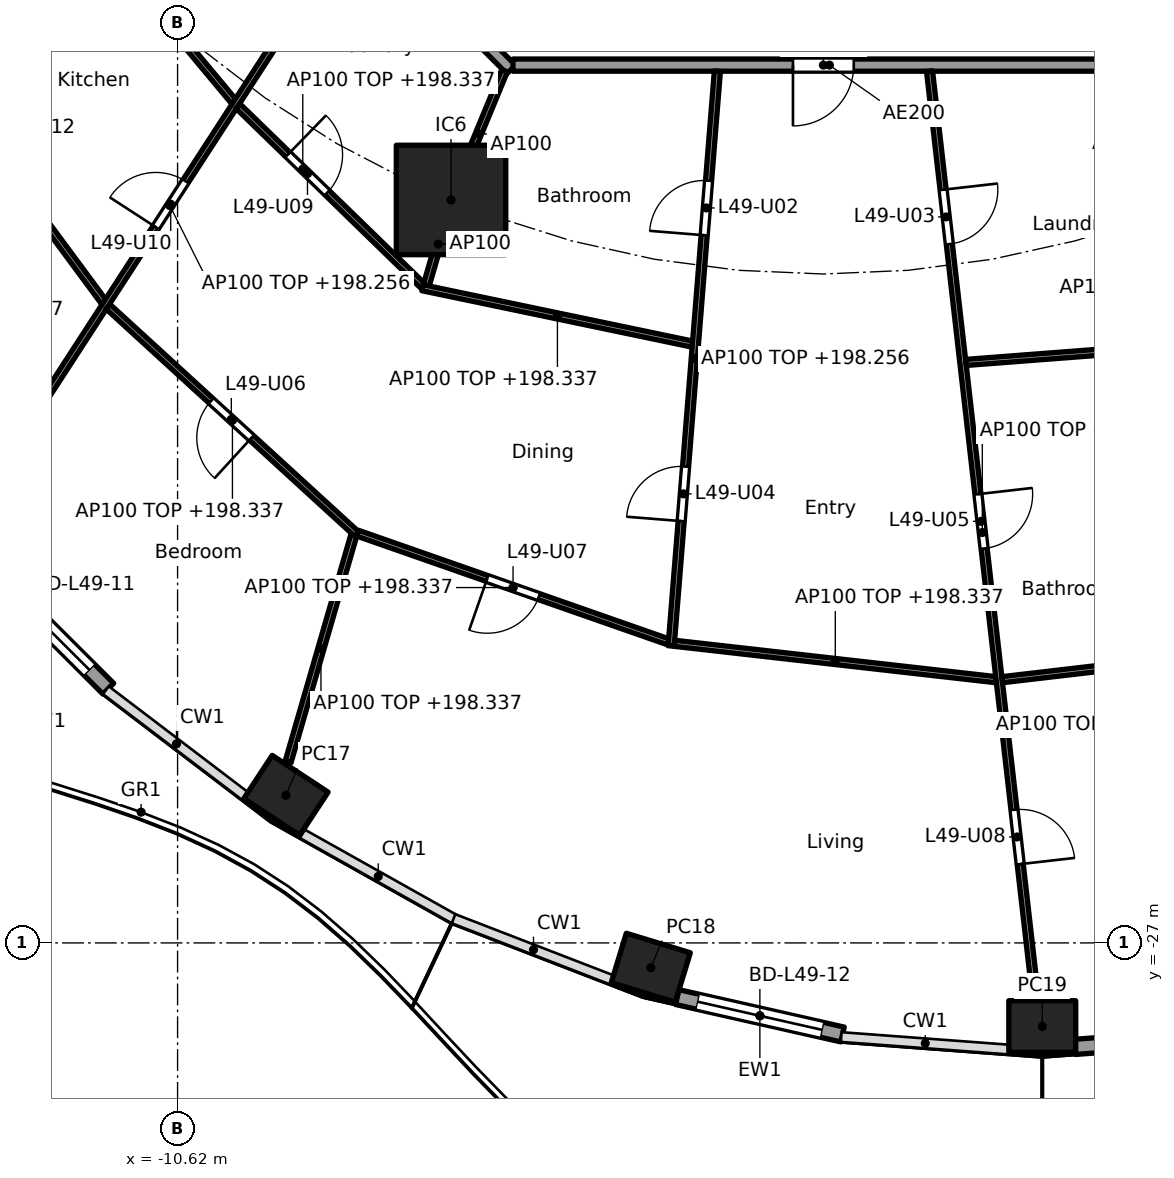
"""IFC4 building model, lengths in metres.
Left out: names, types, materials, properties, quantities, classifications, styles, units other than length and angle.
Written with IfcOpenShell. Run it as: python <this file> out.ifc"""

import sys

from ifc_helpers import new_model, si_unit, direction, frame, frame_2d, origin, origin_2d, place, context, subcontext, project, spatial, rectangle, hollow_rectangle, extrude, element, fill, save


model = new_model("IFC4")
c1 = context("Model", 3, precision=1e-05, world=origin(), true_north=direction((0.0, 1.0)))
c2 = subcontext(c1, "Body", "Model", "MODEL_VIEW")
j1 = project(units=[si_unit("LENGTHUNIT", "METRE"), si_unit("PLANEANGLEUNIT", "RADIAN")], contexts=[c1])
p1 = place(None, origin())
s1 = spatial("IfcSite", under=j1, at=p1, CompositionType="ELEMENT")
p2 = place(p1, origin())
s2 = spatial("IfcBuilding", under=s1, at=p2, CompositionType="ELEMENT")
p3 = place(p2, frame((0.0, 0.0, 195.5)))
s3 = spatial("IfcBuildingStorey", under=s2, at=p3, CompositionType="ELEMENT", Elevation=195.5)
for number, where, z_axis, x_axis in (
    (1, (-8.837, -24.573, 0.0), (0.0, 0.0, 1.0), (0.836, -0.549, 0.0)),
    (2, (-2.838, -27.408, 0.0), (0.0, 0.0, 1.0), (0.957, -0.292, 0.0)),
    (3, (3.6, -28.375, 0.0), (0.0, 0.0, 1.0), (1.0, 0.0, 0.0)),
):
    element("IfcColumn", number, at=place(p3, frame(where, z_axis=z_axis, x_axis=x_axis)), inside=s3, PredefinedType="COLUMN", context=c2, shape_type="SweptSolid", body=[
        extrude(hollow_rectangle(XDim=1.1, YDim=0.85, WallThickness=0.036, at=origin_2d()), origin(), (0.0, 0.0, 1.0), 3.7),
    ])
p4 = place(p3, frame((-6.123, -14.782, 0.0), z_axis=(0.0, 0.0, 1.0), x_axis=(1.0, 0.0, 0.0)))
e4 = element("IfcColumn", 4, at=p4, inside=s3, PredefinedType="COLUMN", context=c2, shape_type="SweptSolid", body=[
    extrude(rectangle(XDim=1.8, YDim=1.8, at=origin_2d()), origin(), (0.0, 0.0, 1.0), 3.7),
])
p5 = place(p3, frame((-11.759, -22.82, 0.0), z_axis=(0.0, 0.0, 1.0), x_axis=(-0.707844845069, 0.706367946122, 0.0)))
e5 = element("IfcWall", 5, at=p5, inside=s3, PredefinedType="SOLIDWALL", context=c2, shape_type="SweptSolid", body=[
    extrude(rectangle(XDim=2.976, YDim=0.25, at=frame_2d((1.488, 0.0))), origin(), (0.0, 0.0, 1.0), 3.44),
])
p6 = place(p5, frame((0.438, 0.0, 0.0)))
e6 = element("IfcOpeningElement", 6, at=p6, cuts=e5, PredefinedType="OPENING", context=c2, shape_type="SweptSolid", body=[
    extrude(rectangle(XDim=2.1, YDim=2.4, at=frame_2d((1.05, 1.2))), frame((0.0, 0.135, 0.0), z_axis=(0.0, -1.0, 0.0), x_axis=(1.0, 0.0, 0.0)), (0.0, 0.0, 1.0), 0.27),
])
p7 = place(p3, frame((0.315, -28.506, 0.0), z_axis=(0.0, 0.0, 1.0), x_axis=(-0.975324329911, 0.220776926974, 0.0)))
e7 = element("IfcWall", 7, at=p7, inside=s3, PredefinedType="SOLIDWALL", context=c2, shape_type="SweptSolid", body=[
    extrude(rectangle(XDim=2.788, YDim=0.25, at=frame_2d((1.394, 0.0))), origin(), (0.0, 0.0, 1.0), 3.44),
])
p8 = place(p7, frame((0.344, 0.0, 0.0)))
e8 = element("IfcOpeningElement", 8, at=p8, cuts=e7, PredefinedType="OPENING", context=c2, shape_type="SweptSolid", body=[
    extrude(rectangle(XDim=2.1, YDim=2.4, at=frame_2d((1.05, 1.2))), frame((0.0, 0.135, 0.0), z_axis=(0.0, -1.0, 0.0), x_axis=(1.0, 0.0, 0.0)), (0.0, 0.0, 1.0), 0.27),
])
p9 = place(p3, frame((6.903, -28.503, 0.0), z_axis=(0.0, 0.0, 1.0), x_axis=(-0.997232064422, -0.074351931305, 0.0)))
e9 = element("IfcWall", 9, at=p9, inside=s3, PredefinedType="SOLIDWALL", context=c2, shape_type="SweptSolid", body=[
    extrude(rectangle(XDim=2.771, YDim=0.25, at=frame_2d((1.386, 0.0))), origin(), (0.0, 0.0, 1.0), 3.44),
])
p10 = place(p9, frame((0.336, 0.0, 0.0)))
e10 = element("IfcOpeningElement", 10, at=p10, cuts=e9, PredefinedType="OPENING", context=c2, shape_type="SweptSolid", body=[
    extrude(rectangle(XDim=2.1, YDim=2.4, at=frame_2d((1.05, 1.2))), frame((0.0, 0.135, 0.0), z_axis=(0.0, -1.0, 0.0), x_axis=(1.0, 0.0, 0.0)), (0.0, 0.0, 1.0), 0.27),
])
p11 = place(p3, frame((-12.635, -5.134, 0.0), z_axis=(0.0, 0.0, 1.0), x_axis=(0.707106781187, -0.707106781187, 0.0)))
e11 = element("IfcWall", 11, at=p11, inside=s3, PredefinedType="PARTITIONING", context=c2, shape_type="SweptSolid", body=[
    extrude(rectangle(XDim=10.609, YDim=0.2, at=frame_2d((5.305, 0.0))), origin(), (0.0, 0.0, 1.0), 3.44),
])
p12 = place(p3, frame((-5.104, -12.565, 0.0), z_axis=(0.0, 0.0, 1.0), x_axis=(1.0, 0.0, 0.0)))
e12 = element("IfcWall", 12, at=p12, inside=s3, PredefinedType="PARTITIONING", context=c2, shape_type="SweptSolid", body=[
    extrude(rectangle(XDim=10.409, YDim=0.2, at=frame_2d((5.205, 0.0))), origin(), (0.0, 0.0, 1.0), 3.44),
])
p13 = place(p12, frame((4.604, 0.0, 0.0)))
e13 = element("IfcOpeningElement", 13, at=p13, cuts=e12, PredefinedType="OPENING", context=c2, shape_type="SweptSolid", body=[
    extrude(rectangle(XDim=1.0, YDim=2.1, at=frame_2d((0.5, 1.05))), frame((0.0, 0.11, 0.0), z_axis=(0.0, -1.0, 0.0), x_axis=(1.0, 0.0, 0.0)), (0.0, 0.0, 1.0), 0.22),
])
p14 = place(p3, frame((-12.623, -9.653, 0.0), z_axis=(0.0, 0.0, 1.0), x_axis=(0.640315711982, -0.768111833647, 0.0)))
e14 = element("IfcWall", 14, at=p14, inside=s3, PredefinedType="PARTITIONING", context=c2, shape_type="SweptSolid", body=[
    extrude(rectangle(XDim=4.572, YDim=0.1, at=frame_2d((2.286, 0.0))), origin(), (0.0, 0.0, 1.0), 2.837),
])
p15 = place(p14, frame((1.861, 0.0, 0.0)))
e15 = element("IfcOpeningElement", 15, at=p15, cuts=e14, PredefinedType="OPENING", context=c2, shape_type="SweptSolid", body=[
    extrude(rectangle(XDim=0.9, YDim=2.1, at=frame_2d((0.45, 1.05))), frame((0.0, 0.06, 0.0), z_axis=(0.0, -1.0, 0.0), x_axis=(1.0, 0.0, 0.0)), (0.0, 0.0, 1.0), 0.12),
])
p16 = place(p3, frame((-15.265, -11.821, 0.0), z_axis=(0.0, 0.0, 1.0), x_axis=(0.594721645029, -0.803931691709, 0.0)))
e16 = element("IfcWall", 16, at=p16, inside=s3, PredefinedType="PARTITIONING", context=c2, shape_type="SweptSolid", body=[
    extrude(rectangle(XDim=5.772, YDim=0.1, at=frame_2d((2.886, 0.0))), origin(), (0.0, 0.0, 1.0), 2.837),
])
p17 = place(p16, frame((2.461, 0.0, 0.0)))
e17 = element("IfcOpeningElement", 17, at=p17, cuts=e16, PredefinedType="OPENING", context=c2, shape_type="SweptSolid", body=[
    extrude(rectangle(XDim=0.9, YDim=2.1, at=frame_2d((0.45, 1.05))), frame((0.0, 0.06, 0.0), z_axis=(0.0, -1.0, 0.0), x_axis=(1.0, 0.0, 0.0)), (0.0, 0.0, 1.0), 0.12),
])
p18 = place(p3, frame((-7.712, -10.195, 0.0), z_axis=(0.0, 0.0, 1.0), x_axis=(-0.544176533609, -0.838970738625, 0.0)))
e18 = element("IfcWall", 18, at=p18, inside=s3, PredefinedType="PARTITIONING", context=c2, shape_type="SweptSolid", body=[
    extrude(rectangle(XDim=11.156, YDim=0.1, at=frame_2d((5.578, 0.0))), origin(), (0.0, 0.0, 1.0), 2.756),
])
p19 = place(p18, frame((5.101, 0.0, 0.0)))
e19 = element("IfcOpeningElement", 19, at=p19, cuts=e18, PredefinedType="OPENING", context=c2, shape_type="SweptSolid", body=[
    extrude(rectangle(XDim=0.9, YDim=2.1, at=frame_2d((0.45, 1.05))), frame((0.0, 0.06, 0.0), z_axis=(0.0, -1.0, 0.0), x_axis=(1.0, 0.0, 0.0)), (0.0, 0.0, 1.0), 0.12),
])
p20 = place(p3, frame((-9.627, -13.238, 0.0), z_axis=(0.0, 0.0, 1.0), x_axis=(0.716946269374, -0.697128429223, 0.0)))
e20 = element("IfcWall", 20, at=p20, inside=s3, PredefinedType="PARTITIONING", context=c2, shape_type="SweptSolid", body=[
    extrude(rectangle(XDim=4.25, YDim=0.1, at=frame_2d((2.125, 0.0))), origin(), (0.0, 0.0, 1.0), 2.837),
])
p21 = place(p20, frame((1.145, 0.0, 0.0)))
e21 = element("IfcOpeningElement", 21, at=p21, cuts=e20, PredefinedType="OPENING", context=c2, shape_type="SweptSolid", body=[
    extrude(rectangle(XDim=0.9, YDim=2.1, at=frame_2d((0.45, 1.05))), frame((0.0, 0.06, 0.0), z_axis=(0.0, -1.0, 0.0), x_axis=(1.0, 0.0, 0.0)), (0.0, 0.0, 1.0), 0.12),
])
p22 = place(p3, frame((-11.766, -16.535, 0.0), z_axis=(0.0, 0.0, 1.0), x_axis=(0.738053852169, -0.674741810842, 0.0)))
e22 = element("IfcWall", 22, at=p22, inside=s3, PredefinedType="PARTITIONING", context=c2, shape_type="SweptSolid", body=[
    extrude(rectangle(XDim=5.549, YDim=0.1, at=frame_2d((2.774, 0.0))), origin(), (0.0, 0.0, 1.0), 2.837),
])
p23 = place(p22, frame((2.3, 0.0, 0.0)))
e23 = element("IfcOpeningElement", 23, at=p23, cuts=e22, PredefinedType="OPENING", context=c2, shape_type="SweptSolid", body=[
    extrude(rectangle(XDim=0.9, YDim=2.1, at=frame_2d((0.45, 1.05))), frame((0.0, 0.06, 0.0), z_axis=(0.0, -1.0, 0.0), x_axis=(1.0, 0.0, 0.0)), (0.0, 0.0, 1.0), 0.12),
])
p24 = place(p3, frame((-5.243, -12.657, 0.0), z_axis=(0.0, 0.0, 1.0), x_axis=(-0.382719158442, -0.923864733477, 0.0)))
e24 = element("IfcWall", 24, at=p24, inside=s3, PredefinedType="PARTITIONING", context=c2, shape_type="SweptSolid", body=[
    extrude(rectangle(XDim=2.25, YDim=0.1, at=frame_2d((1.125, 0.0))), origin(), (0.0, 0.0, 1.0), 3.44),
])
p25 = place(p3, frame((-6.137, -14.831, 0.0), z_axis=(0.0, 0.0, 1.0), x_axis=(-0.2785069197, -0.960434222464, 0.0)))
e25 = element("IfcWall", 25, at=p25, inside=s3, PredefinedType="PARTITIONING", context=c2, shape_type="SweptSolid", body=[
    extrude(rectangle(XDim=1.413, YDim=0.1, at=frame_2d((0.707, 0.0))), origin(), (0.0, 0.0, 1.0), 3.44),
])
p26 = place(p3, frame((-6.594, -16.226, 0.0), z_axis=(0.0, 0.0, 1.0), x_axis=(0.978902428641, -0.204328253553, 0.0)))
e26 = element("IfcWall", 26, at=p26, inside=s3, PredefinedType="PARTITIONING", context=c2, shape_type="SweptSolid", body=[
    extrude(rectangle(XDim=4.536, YDim=0.1, at=frame_2d((2.268, 0.0))), origin(), (0.0, 0.0, 1.0), 2.837),
])
p27 = place(p3, frame((-7.721, -20.293, 0.0), z_axis=(0.0, 0.0, 1.0), x_axis=(-0.278445616281, -0.960451997121, 0.0)))
e27 = element("IfcWall", 27, at=p27, inside=s3, PredefinedType="PARTITIONING", context=c2, shape_type="SweptSolid", body=[
    extrude(rectangle(XDim=3.885, YDim=0.1, at=frame_2d((1.942, 0.0))), origin(), (0.0, 0.0, 1.0), 2.837),
])
p28 = place(p3, frame((-7.66, -20.262, 0.0), z_axis=(0.0, 0.0, 1.0), x_axis=(0.943911038661, -0.330199865375, 0.0)))
e28 = element("IfcWall", 28, at=p28, inside=s3, PredefinedType="PARTITIONING", context=c2, shape_type="SweptSolid", body=[
    extrude(rectangle(XDim=5.417, YDim=0.1, at=frame_2d((2.709, 0.0))), origin(), (0.0, 0.0, 1.0), 2.837),
])
p29 = place(p28, frame((2.259, 0.0, 0.0)))
e29 = element("IfcOpeningElement", 29, at=p29, cuts=e28, PredefinedType="OPENING", context=c2, shape_type="SweptSolid", body=[
    extrude(rectangle(XDim=0.9, YDim=2.1, at=frame_2d((0.45, 1.05))), frame((0.0, 0.06, 0.0), z_axis=(0.0, -1.0, 0.0), x_axis=(1.0, 0.0, 0.0)), (0.0, 0.0, 1.0), 0.12),
])
p30 = place(p3, frame((-1.743, -12.665, 0.0), z_axis=(0.0, 0.0, 1.0), x_axis=(-0.080170892619, -0.996781133437, 0.0)))
e30 = element("IfcWall", 30, at=p30, inside=s3, PredefinedType="PARTITIONING", context=c2, shape_type="SweptSolid", body=[
    extrude(rectangle(XDim=9.483, YDim=0.1, at=frame_2d((4.741, 0.0))), origin(), (0.0, 0.0, 1.0), 2.756),
])
p31 = place(p30, frame((1.806, 0.0, 0.0)))
e31 = element("IfcOpeningElement", 31, at=p31, cuts=e30, PredefinedType="OPENING", context=c2, shape_type="SweptSolid", body=[
    extrude(rectangle(XDim=0.9, YDim=2.1, at=frame_2d((0.45, 1.05))), frame((0.0, 0.06, 0.0), z_axis=(0.0, -1.0, 0.0), x_axis=(1.0, 0.0, 0.0)), (0.0, 0.0, 1.0), 0.12),
])
p32 = place(p30, frame((6.523, 0.0, 0.0)))
e32 = element("IfcOpeningElement", 32, at=p32, cuts=e30, PredefinedType="OPENING", context=c2, shape_type="SweptSolid", body=[
    extrude(rectangle(XDim=0.9, YDim=2.1, at=frame_2d((0.45, 1.05))), frame((0.0, 0.06, 0.0), z_axis=(0.0, -1.0, 0.0), x_axis=(1.0, 0.0, 0.0)), (0.0, 0.0, 1.0), 0.12),
])
p33 = place(p3, frame((-2.449, -22.073, 0.0), z_axis=(0.0, 0.0, 1.0), x_axis=(0.993660315081, -0.112424099879, 0.0)))
e33 = element("IfcWall", 33, at=p33, inside=s3, PredefinedType="PARTITIONING", context=c2, shape_type="SweptSolid", body=[
    extrude(rectangle(XDim=5.325, YDim=0.1, at=frame_2d((2.662, 0.0))), origin(), (0.0, 0.0, 1.0), 2.837),
])
p34 = place(p3, frame((1.746, -12.664, 0.0), z_axis=(0.0, 0.0, 1.0), x_axis=(0.113624134758, -0.993523807465, 0.0)))
e34 = element("IfcWall", 34, at=p34, inside=s3, PredefinedType="PARTITIONING", context=c2, shape_type="SweptSolid", body=[
    extrude(rectangle(XDim=15.273, YDim=0.1, at=frame_2d((7.636, 0.0))), origin(), (0.0, 0.0, 1.0), 2.756),
])
p35 = place(p34, frame((1.962, 0.0, 0.0)))
e35 = element("IfcOpeningElement", 35, at=p35, cuts=e34, PredefinedType="OPENING", context=c2, shape_type="SweptSolid", body=[
    extrude(rectangle(XDim=0.9, YDim=2.1, at=frame_2d((0.45, 1.05))), frame((0.0, 0.06, 0.0), z_axis=(0.0, -1.0, 0.0), x_axis=(1.0, 0.0, 0.0)), (0.0, 0.0, 1.0), 0.12),
])
p36 = place(p34, frame((7.002, 0.0, 0.0)))
e36 = element("IfcOpeningElement", 36, at=p36, cuts=e34, PredefinedType="OPENING", context=c2, shape_type="SweptSolid", body=[
    extrude(rectangle(XDim=0.9, YDim=2.1, at=frame_2d((0.45, 1.05))), frame((0.0, 0.06, 0.0), z_axis=(0.0, -1.0, 0.0), x_axis=(1.0, 0.0, 0.0)), (0.0, 0.0, 1.0), 0.12),
])
p37 = place(p34, frame((12.226, 0.0, 0.0)))
e37 = element("IfcOpeningElement", 37, at=p37, cuts=e34, PredefinedType="OPENING", context=c2, shape_type="SweptSolid", body=[
    extrude(rectangle(XDim=0.9, YDim=2.1, at=frame_2d((0.45, 1.05))), frame((0.0, 0.06, 0.0), z_axis=(0.0, -1.0, 0.0), x_axis=(1.0, 0.0, 0.0)), (0.0, 0.0, 1.0), 0.12),
])
p38 = place(p3, frame((2.344, -17.454, 0.0), z_axis=(0.0, 0.0, 1.0), x_axis=(0.997077237751, 0.076400143703, 0.0)))
e38 = element("IfcWall", 38, at=p38, inside=s3, PredefinedType="PARTITIONING", context=c2, shape_type="SweptSolid", body=[
    extrude(rectangle(XDim=4.41, YDim=0.1, at=frame_2d((2.205, 0.0))), origin(), (0.0, 0.0, 1.0), 2.837),
])
p39 = place(p3, frame((2.941, -22.671, 0.0), z_axis=(0.0, 0.0, 1.0), x_axis=(0.993247307754, 0.116016316261, 0.0)))
e39 = element("IfcWall", 39, at=p39, inside=s3, PredefinedType="PARTITIONING", context=c2, shape_type="SweptSolid", body=[
    extrude(rectangle(XDim=5.358, YDim=0.1, at=frame_2d((2.679, 0.0))), origin(), (0.0, 0.0, 1.0), 2.837),
])
p40 = place(p39, frame((3.581, 0.0, 0.0)))
e40 = element("IfcOpeningElement", 40, at=p40, cuts=e39, PredefinedType="OPENING", context=c2, shape_type="SweptSolid", body=[
    extrude(rectangle(XDim=0.9, YDim=2.1, at=frame_2d((0.45, 1.05))), frame((0.0, 0.06, 0.0), z_axis=(0.0, -1.0, 0.0), x_axis=(1.0, 0.0, 0.0)), (0.0, 0.0, 1.0), 0.12),
])
p41 = place(p6, origin())
e41 = element("IfcDoor", 41, at=p41, inside=s3, OperationType="SLIDING_TO_LEFT", PredefinedType="DOOR", context=c2, shape_type="SweptSolid", body=[
    extrude(rectangle(XDim=2.1, YDim=2.4, at=frame_2d((1.05, 1.2))), frame((0.0, 0.025, 0.0), z_axis=(0.0, -1.0, 0.0), x_axis=(1.0, 0.0, 0.0)), (0.0, 0.0, 1.0), 0.05),
])
fill(e6, e41)
p42 = place(p8, origin())
e42 = element("IfcDoor", 42, at=p42, inside=s3, OperationType="SLIDING_TO_LEFT", PredefinedType="DOOR", context=c2, shape_type="SweptSolid", body=[
    extrude(rectangle(XDim=2.1, YDim=2.4, at=frame_2d((1.05, 1.2))), frame((0.0, 0.025, 0.0), z_axis=(0.0, -1.0, 0.0), x_axis=(1.0, 0.0, 0.0)), (0.0, 0.0, 1.0), 0.05),
])
fill(e8, e42)
p43 = place(p13, frame((1.0, 0.0, 0.0), x_axis=(-1.0, 0.0, 0.0)))
e43 = element("IfcDoor", 43, at=p43, inside=s3, OperationType="SINGLE_SWING_RIGHT", PredefinedType="DOOR", context=c2, shape_type="SweptSolid", body=[
    extrude(rectangle(XDim=1.0, YDim=2.1, at=frame_2d((0.5, 1.05))), frame((0.0, 0.025, 0.0), z_axis=(0.0, -1.0, 0.0), x_axis=(1.0, 0.0, 0.0)), (0.0, 0.0, 1.0), 0.05),
])
fill(e13, e43)
p44 = place(p31, frame((0.9, 0.0, 0.0), x_axis=(-1.0, 0.0, 0.0)))
e44 = element("IfcDoor", 44, at=p44, inside=s3, OperationType="SINGLE_SWING_LEFT", PredefinedType="DOOR", context=c2, shape_type="SweptSolid", body=[
    extrude(rectangle(XDim=0.9, YDim=2.1, at=frame_2d((0.45, 1.05))), frame((0.0, 0.025, 0.0), z_axis=(0.0, -1.0, 0.0), x_axis=(1.0, 0.0, 0.0)), (0.0, 0.0, 1.0), 0.05),
])
fill(e31, e44)
p45 = place(p35, origin())
e45 = element("IfcDoor", 45, at=p45, inside=s3, OperationType="SINGLE_SWING_LEFT", PredefinedType="DOOR", context=c2, shape_type="SweptSolid", body=[
    extrude(rectangle(XDim=0.9, YDim=2.1, at=frame_2d((0.45, 1.05))), frame((0.0, 0.025, 0.0), z_axis=(0.0, -1.0, 0.0), x_axis=(1.0, 0.0, 0.0)), (0.0, 0.0, 1.0), 0.05),
])
fill(e35, e45)
p46 = place(p32, frame((0.9, 0.0, 0.0), x_axis=(-1.0, 0.0, 0.0)))
e46 = element("IfcDoor", 46, at=p46, inside=s3, OperationType="SINGLE_SWING_LEFT", PredefinedType="DOOR", context=c2, shape_type="SweptSolid", body=[
    extrude(rectangle(XDim=0.9, YDim=2.1, at=frame_2d((0.45, 1.05))), frame((0.0, 0.025, 0.0), z_axis=(0.0, -1.0, 0.0), x_axis=(1.0, 0.0, 0.0)), (0.0, 0.0, 1.0), 0.05),
])
fill(e32, e46)
p47 = place(p36, origin())
e47 = element("IfcDoor", 47, at=p47, inside=s3, OperationType="SINGLE_SWING_LEFT", PredefinedType="DOOR", context=c2, shape_type="SweptSolid", body=[
    extrude(rectangle(XDim=0.9, YDim=2.1, at=frame_2d((0.45, 1.05))), frame((0.0, 0.025, 0.0), z_axis=(0.0, -1.0, 0.0), x_axis=(1.0, 0.0, 0.0)), (0.0, 0.0, 1.0), 0.05),
])
fill(e36, e47)
p48 = place(p23, frame((0.9, 0.0, 0.0), x_axis=(-1.0, 0.0, 0.0)))
e48 = element("IfcDoor", 48, at=p48, inside=s3, OperationType="SINGLE_SWING_LEFT", PredefinedType="DOOR", context=c2, shape_type="SweptSolid", body=[
    extrude(rectangle(XDim=0.9, YDim=2.1, at=frame_2d((0.45, 1.05))), frame((0.0, 0.025, 0.0), z_axis=(0.0, -1.0, 0.0), x_axis=(1.0, 0.0, 0.0)), (0.0, 0.0, 1.0), 0.05),
])
fill(e23, e48)
p49 = place(p29, frame((0.9, 0.0, 0.0), x_axis=(-1.0, 0.0, 0.0)))
e49 = element("IfcDoor", 49, at=p49, inside=s3, OperationType="SINGLE_SWING_RIGHT", PredefinedType="DOOR", context=c2, shape_type="SweptSolid", body=[
    extrude(rectangle(XDim=0.9, YDim=2.1, at=frame_2d((0.45, 1.05))), frame((0.0, 0.025, 0.0), z_axis=(0.0, -1.0, 0.0), x_axis=(1.0, 0.0, 0.0)), (0.0, 0.0, 1.0), 0.05),
])
fill(e29, e49)
p50 = place(p37, origin())
e50 = element("IfcDoor", 50, at=p50, inside=s3, OperationType="SINGLE_SWING_RIGHT", PredefinedType="DOOR", context=c2, shape_type="SweptSolid", body=[
    extrude(rectangle(XDim=0.9, YDim=2.1, at=frame_2d((0.45, 1.05))), frame((0.0, 0.025, 0.0), z_axis=(0.0, -1.0, 0.0), x_axis=(1.0, 0.0, 0.0)), (0.0, 0.0, 1.0), 0.05),
])
fill(e37, e50)
p51 = place(p21, origin())
e51 = element("IfcDoor", 51, at=p51, inside=s3, OperationType="SINGLE_SWING_LEFT", PredefinedType="DOOR", context=c2, shape_type="SweptSolid", body=[
    extrude(rectangle(XDim=0.9, YDim=2.1, at=frame_2d((0.45, 1.05))), frame((0.0, 0.025, 0.0), z_axis=(0.0, -1.0, 0.0), x_axis=(1.0, 0.0, 0.0)), (0.0, 0.0, 1.0), 0.05),
])
fill(e21, e51)
p52 = place(p19, frame((0.9, 0.0, 0.0), x_axis=(-1.0, 0.0, 0.0)))
e52 = element("IfcDoor", 52, at=p52, inside=s3, OperationType="SINGLE_SWING_LEFT", PredefinedType="DOOR", context=c2, shape_type="SweptSolid", body=[
    extrude(rectangle(XDim=0.9, YDim=2.1, at=frame_2d((0.45, 1.05))), frame((0.0, 0.025, 0.0), z_axis=(0.0, -1.0, 0.0), x_axis=(1.0, 0.0, 0.0)), (0.0, 0.0, 1.0), 0.05),
])
fill(e19, e52)
save(model, sys.argv[1])
